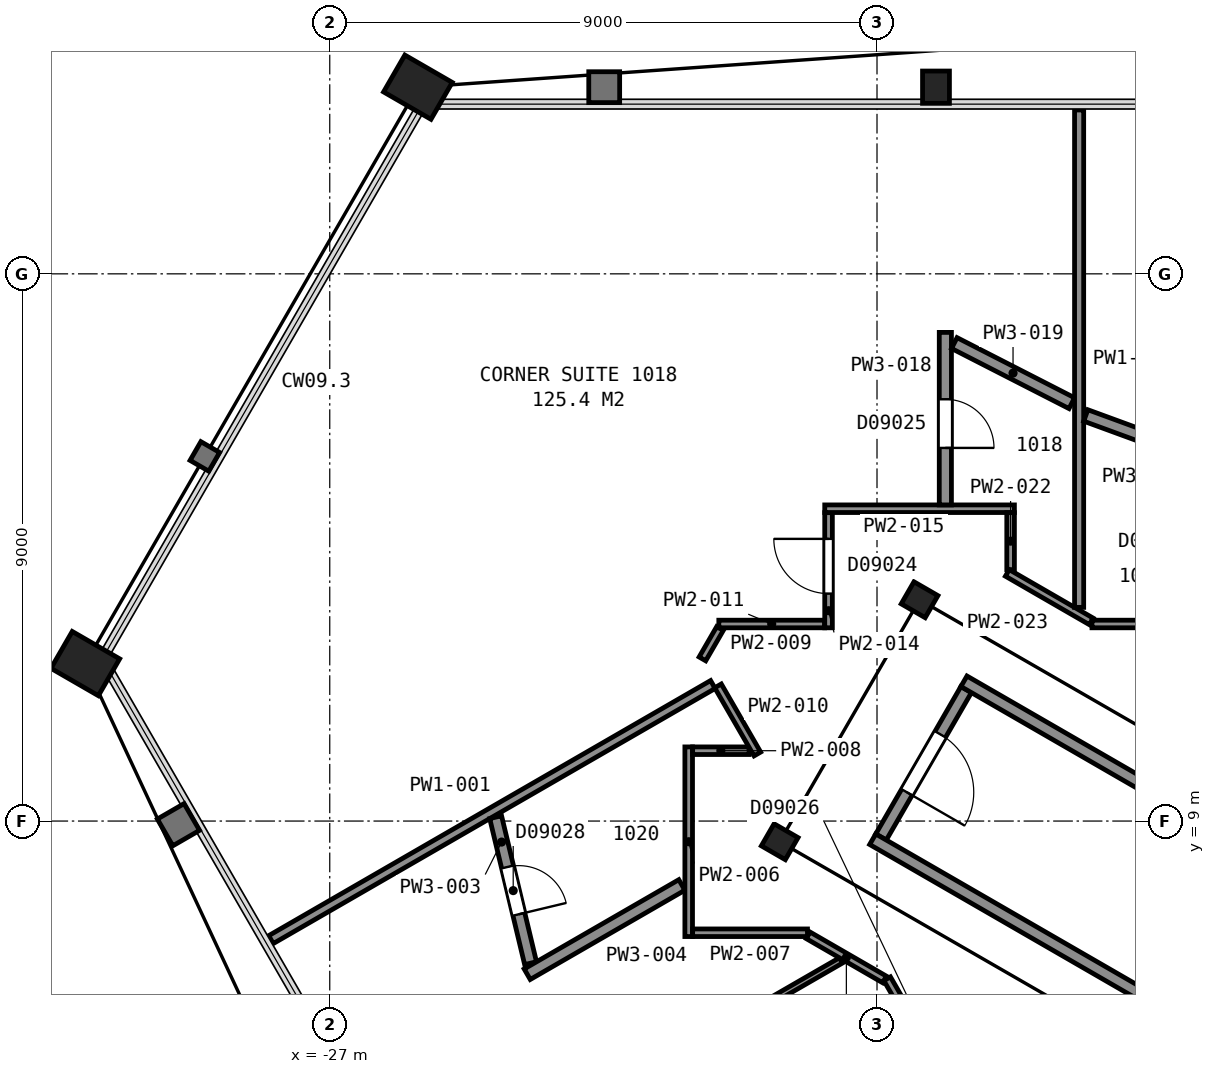
"""IFC4 building model, lengths in metres.
Left out: names, types, materials, properties, quantities, classifications, styles, units other than length and angle.
Written with IfcOpenShell. Run it as: python <this file> out.ifc"""

import sys

from ifc_helpers import new_model, si_unit, direction, frame, frame_2d, origin, origin_2d, place, context, subcontext, project, spatial, rectangle, hollow_rectangle, i_section, extrude, element, fill, save


model = new_model("IFC4")
c1 = context("Model", 3, precision=1e-05, world=origin(), true_north=direction((0.0, 1.0)))
c2 = subcontext(c1, "Body", "Model", "MODEL_VIEW")
j1 = project(units=[si_unit("LENGTHUNIT", "METRE"), si_unit("PLANEANGLEUNIT", "RADIAN")], contexts=[c1])
p1 = place(None, origin())
s1 = spatial("IfcSite", under=j1, at=p1, CompositionType="ELEMENT")
p2 = place(p1, origin())
s2 = spatial("IfcBuilding", under=s1, at=p2, CompositionType="ELEMENT")
p3 = place(p2, frame((0.0, 0.0, 51.2)))
s3 = spatial("IfcBuildingStorey", under=s2, at=p3, CompositionType="ELEMENT", Elevation=51.2)
p4 = place(p3, frame((-17.03, 21.07, 0.0), z_axis=(0.0, 0.0, 1.0), x_axis=(1.0, 0.0, 0.0)))
e1 = element("IfcColumn", 1, at=p4, inside=s3, PredefinedType="COLUMN", context=c2, shape_type="SweptSolid", body=[
    extrude(i_section(OverallWidth=0.442, OverallDepth=0.531, WebThickness=0.066, FlangeThickness=0.106, FilletRadius=0.015, at=origin_2d()), origin(), (0.0, 0.0, 1.0), 3.6),
])
for number, where, z_axis, x_axis in (
    (2, (-25.55, 21.07, 0.0), (0.0, 0.0, 1.0), (0.5, 0.866, 0.0)),
    (3, (-31.02, 11.59, 0.0), (0.0, 0.0, 1.0), (0.5, 0.866, 0.0)),
):
    element("IfcColumn", number, at=place(p3, frame(where, z_axis=z_axis, x_axis=x_axis)), inside=s3, PredefinedType="COLUMN", context=c2, shape_type="SweptSolid", body=[
        extrude(hollow_rectangle(XDim=0.7, YDim=0.9, WallThickness=0.065, at=origin_2d()), origin(), (0.0, 0.0, 1.0), 3.6),
    ])
for number, where, z_axis, x_axis in (
    (4, (-17.3, 12.64, 0.0), (0.0, 0.0, 1.0), (0.5, 0.866, 0.0)),
    (5, (-19.6, 8.66, 0.0), (0.0, 0.0, 1.0), (0.5, 0.866, 0.0)),
):
    element("IfcColumn", number, at=place(p3, frame(where, z_axis=z_axis, x_axis=x_axis)), inside=s3, PredefinedType="COLUMN", context=c2, shape_type="SweptSolid", body=[
        extrude(i_section(OverallWidth=0.419, OverallDepth=0.455, WebThickness=0.042, FlangeThickness=0.068, FilletRadius=0.015, at=origin_2d()), origin(), (0.0, 0.0, 1.0), 3.6),
    ])
p5 = place(p3, frame((-16.534, 11.162, 0.0), z_axis=(0.0, 0.0, 1.0), x_axis=(-0.49998411664, -0.866034573852, 0.0)))
e6 = element("IfcWall", 6, at=p5, inside=s3, PredefinedType="PARTITIONING", context=c2, shape_type="SweptSolid", body=[
    extrude(rectangle(XDim=2.8, YDim=0.2, at=frame_2d((1.4, 0.0))), origin(), (0.0, 0.0, 1.0), 3.35),
])
p6 = place(p5, frame((0.85, 0.0, 0.0)))
e7 = element("IfcOpeningElement", 7, at=p6, cuts=e6, PredefinedType="OPENING", context=c2, shape_type="SweptSolid", body=[
    extrude(rectangle(XDim=1.1, YDim=2.1, at=frame_2d((0.55, 1.05))), frame((0.0, 0.11, 0.0), z_axis=(0.0, -1.0, 0.0), x_axis=(1.0, 0.0, 0.0)), (0.0, 0.0, 1.0), 0.22),
])
for number, where, z_axis, x_axis in (
    (8, (-7.678, 2.701, 0.0), (0.0, 0.0, 1.0), (-0.866, 0.5, 0.0)),
    (9, (-6.178, 5.299, 0.0), (0.0, 0.0, 1.0), (-0.866, 0.5, 0.0)),
):
    element("IfcWall", number, at=place(p3, frame(where, z_axis=z_axis, x_axis=x_axis)), inside=s3, PredefinedType="PARTITIONING", context=c2, shape_type="SweptSolid", body=[
        extrude(rectangle(XDim=12.0, YDim=0.2, at=frame_2d((6.0, 0.0))), origin(), (0.0, 0.0, 1.0), 3.35),
    ])
p7 = place(p3, frame((-27.967, 7.05, 0.0), z_axis=(0.0, 0.0, 1.0), x_axis=(0.86603249375, 0.499987719618, 0.0)))
e10 = element("IfcWall", 10, at=p7, inside=s3, PredefinedType="PARTITIONING", context=c2, shape_type="SweptSolid", body=[
    extrude(rectangle(XDim=8.392, YDim=0.15, at=frame_2d((4.196, 0.0))), origin(), (0.0, 0.0, 1.0), 2.613),
])
p8 = place(p3, frame((-25.476, 2.735, 0.0), z_axis=(0.0, 0.0, 1.0), x_axis=(0.866077639848, 0.499909513568, 0.0)))
e11 = element("IfcWall", 11, at=p8, inside=s3, PredefinedType="PARTITIONING", context=c2, shape_type="SweptSolid", body=[
    extrude(rectangle(XDim=7.946, YDim=0.1, at=frame_2d((3.973, 0.0))), origin(), (0.0, 0.0, 1.0), 2.613),
])
p9 = place(p8, frame((3.604, 0.0, 0.0)))
e12 = element("IfcOpeningElement", 12, at=p9, cuts=e11, PredefinedType="OPENING", context=c2, shape_type="SweptSolid", body=[
    extrude(rectangle(XDim=0.9, YDim=2.1, at=frame_2d((0.45, 1.05))), frame((0.0, 0.06, 0.0), z_axis=(0.0, -1.0, 0.0), x_axis=(1.0, 0.0, 0.0)), (0.0, 0.0, 1.0), 0.12),
])
p10 = place(p3, frame((-24.272, 9.064, 0.0), z_axis=(0.0, 0.0, 1.0), x_axis=(0.232636237171, -0.972563818551, 0.0)))
e13 = element("IfcWall", 13, at=p10, inside=s3, PredefinedType="PARTITIONING", context=c2, shape_type="SweptSolid", body=[
    extrude(rectangle(XDim=2.469, YDim=0.2, at=frame_2d((1.235, 0.0))), origin(), (0.0, 0.0, 1.0), 2.613),
])
p11 = place(p10, frame((0.842, 0.0, 0.0)))
e14 = element("IfcOpeningElement", 14, at=p11, cuts=e13, PredefinedType="OPENING", context=c2, shape_type="SweptSolid", body=[
    extrude(rectangle(XDim=0.8, YDim=2.1, at=frame_2d((0.4, 1.05))), frame((0.0, 0.11, 0.0), z_axis=(0.0, -1.0, 0.0), x_axis=(1.0, 0.0, 0.0)), (0.0, 0.0, 1.0), 0.22),
])
p12 = place(p3, frame((-23.753, 6.481, 0.0), z_axis=(0.0, 0.0, 1.0), x_axis=(0.866070680301, 0.499921570572, 0.0)))
e15 = element("IfcWall", 15, at=p12, inside=s3, PredefinedType="PARTITIONING", context=c2, shape_type="SweptSolid", body=[
    extrude(rectangle(XDim=2.937, YDim=0.2, at=frame_2d((1.468, 0.0))), origin(), (0.0, 0.0, 1.0), 2.613),
])
p13 = place(p3, frame((-21.097, 7.101, 0.0), z_axis=(0.0, 0.0, 1.0), x_axis=(0.0, 1.0, 0.0)))
e16 = element("IfcWall", 16, at=p13, inside=s3, PredefinedType="PARTITIONING", context=c2, shape_type="SweptSolid", body=[
    extrude(rectangle(XDim=3.119, YDim=0.125, at=frame_2d((1.56, 0.0))), origin(), (0.0, 0.0, 1.0), 2.613),
])
p14 = place(p3, frame((-21.032, 7.163, 0.0), z_axis=(0.0, 0.0, 1.0), x_axis=(1.0, 0.0, 0.0)))
e17 = element("IfcWall", 17, at=p14, inside=s3, PredefinedType="PARTITIONING", context=c2, shape_type="SweptSolid", body=[
    extrude(rectangle(XDim=1.888, YDim=0.125, at=frame_2d((0.944, 0.0))), origin(), (0.0, 0.0, 1.0), 2.613),
])
p15 = place(p3, frame((-21.032, 10.157, 0.0), z_axis=(0.0, 0.0, 1.0), x_axis=(1.0, 0.0, 0.0)))
e18 = element("IfcWall", 18, at=p15, inside=s3, PredefinedType="PARTITIONING", context=c2, shape_type="SweptSolid", body=[
    extrude(rectangle(XDim=0.928, YDim=0.125, at=frame_2d((0.464, 0.0))), origin(), (0.0, 0.0, 1.0), 2.613),
])
p16 = place(p3, frame((-20.871, 11.667, 0.0), z_axis=(0.0, 0.0, 1.0), x_axis=(0.500769941337, 0.865580421367, 0.0)))
e19 = element("IfcWall", 19, at=p16, inside=s3, PredefinedType="PARTITIONING", context=c2, shape_type="SweptSolid", body=[
    extrude(rectangle(XDim=0.578, YDim=0.125, at=frame_2d((0.289, 0.0))), origin(), (0.0, 0.0, 1.0), 2.613),
])
p17 = place(p3, frame((-20.615, 11.223, 0.0), z_axis=(0.0, 0.0, 1.0), x_axis=(0.500076370288, -0.865981306888, 0.0)))
e20 = element("IfcWall", 20, at=p17, inside=s3, PredefinedType="PARTITIONING", context=c2, shape_type="SweptSolid", body=[
    extrude(rectangle(XDim=1.294, YDim=0.125, at=frame_2d((0.647, 0.0))), origin(), (0.0, 0.0, 1.0), 2.613),
])
p18 = place(p3, frame((-20.602, 12.241, 0.0), z_axis=(0.0, 0.0, 1.0), x_axis=(1.0, 0.0, 0.0)))
e21 = element("IfcWall", 21, at=p18, inside=s3, PredefinedType="PARTITIONING", context=c2, shape_type="SweptSolid", body=[
    extrude(rectangle(XDim=1.74, YDim=0.125, at=frame_2d((0.87, 0.0))), origin(), (0.0, 0.0, 1.0), 2.613),
])
p19 = place(p3, frame((-19.132, 7.121, 0.0), z_axis=(0.0, 0.0, 1.0), x_axis=(0.865894215669, -0.500227155672, 0.0)))
e22 = element("IfcWall", 22, at=p19, inside=s3, PredefinedType="PARTITIONING", context=c2, shape_type="SweptSolid", body=[
    extrude(rectangle(XDim=1.451, YDim=0.125, at=frame_2d((0.726, 0.0))), origin(), (0.0, 0.0, 1.0), 2.613),
])
p20 = place(p3, frame((-18.797, 12.178, 0.0), z_axis=(0.0, 0.0, 1.0), x_axis=(0.0, 1.0, 0.0)))
e23 = element("IfcWall", 23, at=p20, inside=s3, PredefinedType="PARTITIONING", context=c2, shape_type="SweptSolid", body=[
    extrude(rectangle(XDim=1.894, YDim=0.125, at=frame_2d((0.947, 0.0))), origin(), (0.0, 0.0, 1.0), 2.613),
])
p21 = place(p20, frame((0.562, 0.0, 0.0)))
e24 = element("IfcOpeningElement", 24, at=p21, cuts=e23, PredefinedType="OPENING", context=c2, shape_type="SweptSolid", body=[
    extrude(rectangle(XDim=0.9, YDim=2.1, at=frame_2d((0.45, 1.05))), frame((0.0, 0.073, 0.0), z_axis=(0.0, -1.0, 0.0), x_axis=(1.0, 0.0, 0.0)), (0.0, 0.0, 1.0), 0.145),
])
p22 = place(p3, frame((-18.86, 14.137, 0.0), z_axis=(0.0, 0.0, 1.0), x_axis=(1.0, 0.0, 0.0)))
e25 = element("IfcWall", 25, at=p22, inside=s3, PredefinedType="PARTITIONING", context=c2, shape_type="SweptSolid", body=[
    extrude(rectangle(XDim=3.119, YDim=0.125, at=frame_2d((1.56, 0.0))), origin(), (0.0, 0.0, 1.0), 2.613),
])
p23 = place(p3, frame((-3.766, -17.959, 0.0), z_axis=(0.0, 0.0, 1.0), x_axis=(-0.500002884005, 0.866023738697, 0.0)))
e26 = element("IfcWall", 26, at=p23, inside=s3, PredefinedType="PARTITIONING", context=c2, shape_type="SweptSolid", body=[
    extrude(rectangle(XDim=28.135, YDim=0.125, at=frame_2d((14.067, 0.0))), origin(), (0.0, 0.0, 1.0), 2.613),
])
p24 = place(p23, frame((25.422, 0.0, 0.0)))
e27 = element("IfcOpeningElement", 27, at=p24, cuts=e26, PredefinedType="OPENING", context=c2, shape_type="SweptSolid", body=[
    extrude(rectangle(XDim=1.0, YDim=2.1, at=frame_2d((0.5, 1.05))), frame((0.0, 0.073, 0.0), z_axis=(0.0, -1.0, 0.0), x_axis=(1.0, 0.0, 0.0)), (0.0, 0.0, 1.0), 0.145),
])
p25 = place(p23, frame((21.693, 0.0, 0.0)))
e28 = element("IfcOpeningElement", 28, at=p25, cuts=e26, PredefinedType="OPENING", context=c2, shape_type="SweptSolid", body=[
    extrude(rectangle(XDim=0.9, YDim=2.1, at=frame_2d((0.45, 1.05))), frame((0.0, 0.073, 0.0), z_axis=(0.0, -1.0, 0.0), x_axis=(1.0, 0.0, 0.0)), (0.0, 0.0, 1.0), 0.145),
])
p26 = place(p23, frame((14.438, 0.0, 0.0)))
e29 = element("IfcOpeningElement", 29, at=p26, cuts=e26, PredefinedType="OPENING", context=c2, shape_type="SweptSolid", body=[
    extrude(rectangle(XDim=0.9, YDim=2.1, at=frame_2d((0.45, 1.05))), frame((0.0, 0.073, 0.0), z_axis=(0.0, -1.0, 0.0), x_axis=(1.0, 0.0, 0.0)), (0.0, 0.0, 1.0), 0.145),
])
p27 = place(p23, frame((11.712, 0.0, 0.0)))
e30 = element("IfcOpeningElement", 30, at=p27, cuts=e26, PredefinedType="OPENING", context=c2, shape_type="SweptSolid", body=[
    extrude(rectangle(XDim=0.9, YDim=2.1, at=frame_2d((0.45, 1.05))), frame((0.0, 0.073, 0.0), z_axis=(0.0, -1.0, 0.0), x_axis=(1.0, 0.0, 0.0)), (0.0, 0.0, 1.0), 0.145),
])
p28 = place(p23, frame((4.787, 0.0, 0.0)))
e31 = element("IfcOpeningElement", 31, at=p28, cuts=e26, PredefinedType="OPENING", context=c2, shape_type="SweptSolid", body=[
    extrude(rectangle(XDim=0.9, YDim=2.1, at=frame_2d((0.45, 1.05))), frame((0.0, 0.073, 0.0), z_axis=(0.0, -1.0, 0.0), x_axis=(1.0, 0.0, 0.0)), (0.0, 0.0, 1.0), 0.145),
])
p29 = place(p23, frame((1.762, 0.0, 0.0)))
e32 = element("IfcOpeningElement", 32, at=p29, cuts=e26, PredefinedType="OPENING", context=c2, shape_type="SweptSolid", body=[
    extrude(rectangle(XDim=0.9, YDim=2.1, at=frame_2d((0.45, 1.05))), frame((0.0, 0.073, 0.0), z_axis=(0.0, -1.0, 0.0), x_axis=(1.0, 0.0, 0.0)), (0.0, 0.0, 1.0), 0.145),
])
p30 = place(p3, frame((-16.876, 17.037, 0.0), z_axis=(0.0, 0.0, 1.0), x_axis=(0.0, -1.0, 0.0)))
e33 = element("IfcWall", 33, at=p30, inside=s3, PredefinedType="PARTITIONING", context=c2, shape_type="SweptSolid", body=[
    extrude(rectangle(XDim=2.838, YDim=0.2, at=frame_2d((1.419, 0.0))), origin(), (0.0, 0.0, 1.0), 2.613),
])
p31 = place(p30, frame((1.1, 0.0, 0.0)))
e34 = element("IfcOpeningElement", 34, at=p31, cuts=e33, PredefinedType="OPENING", context=c2, shape_type="SweptSolid", body=[
    extrude(rectangle(XDim=0.8, YDim=2.1, at=frame_2d((0.4, 1.05))), frame((0.0, 0.11, 0.0), z_axis=(0.0, -1.0, 0.0), x_axis=(1.0, 0.0, 0.0)), (0.0, 0.0, 1.0), 0.22),
])
p32 = place(p3, frame((-16.729, 16.862, 0.0), z_axis=(0.0, 0.0, 1.0), x_axis=(0.890181338078, -0.455606392995, 0.0)))
e35 = element("IfcWall", 35, at=p32, inside=s3, PredefinedType="PARTITIONING", context=c2, shape_type="SweptSolid", body=[
    extrude(rectangle(XDim=2.171, YDim=0.2, at=frame_2d((1.085, 0.0))), origin(), (0.0, 0.0, 1.0), 2.613),
])
p33 = place(p3, frame((-15.803, 13.135, 0.0), z_axis=(0.0, 0.0, 1.0), x_axis=(0.0, 1.0, 0.0)))
e36 = element("IfcWall", 36, at=p33, inside=s3, PredefinedType="PARTITIONING", context=c2, shape_type="SweptSolid", body=[
    extrude(rectangle(XDim=0.937, YDim=0.125, at=frame_2d((0.469, 0.0))), origin(), (0.0, 0.0, 1.0), 2.613),
])
p34 = place(p3, frame((-15.857, 13.081, 0.0), z_axis=(0.0, 0.0, 1.0), x_axis=(0.865974057503, -0.500088923824, 0.0)))
e37 = element("IfcWall", 37, at=p34, inside=s3, PredefinedType="PARTITIONING", context=c2, shape_type="SweptSolid", body=[
    extrude(rectangle(XDim=1.595, YDim=0.125, at=frame_2d((0.798, 0.0))), origin(), (0.0, 0.0, 1.0), 2.613),
])
p35 = place(p3, frame((-14.676, 12.514, 0.0), z_axis=(0.0, 0.0, 1.0), x_axis=(0.0, 1.0, 0.0)))
e38 = element("IfcWall", 38, at=p35, inside=s3, PredefinedType="PARTITIONING", context=c2, shape_type="SweptSolid", body=[
    extrude(rectangle(XDim=8.181, YDim=0.15, at=frame_2d((4.09, 0.0))), origin(), (0.0, 0.0, 1.0), 2.613),
])
p36 = place(p3, frame((-14.567, 15.671, 0.0), z_axis=(0.0, 0.0, 1.0), x_axis=(0.938894816734, -0.344204188105, 0.0)))
e39 = element("IfcWall", 39, at=p36, inside=s3, PredefinedType="PARTITIONING", context=c2, shape_type="SweptSolid", body=[
    extrude(rectangle(XDim=1.99, YDim=0.2, at=frame_2d((0.995, 0.0))), origin(), (0.0, 0.0, 1.0), 2.613),
])
p37 = place(p3, frame((-14.465, 12.241, 0.0), z_axis=(0.0, 0.0, 1.0), x_axis=(1.0, 0.0, 0.0)))
e40 = element("IfcWall", 40, at=p37, inside=s3, PredefinedType="PARTITIONING", context=c2, shape_type="SweptSolid", body=[
    extrude(rectangle(XDim=28.929, YDim=0.125, at=frame_2d((14.465, 0.0))), origin(), (0.0, 0.0, 1.0), 2.613),
])
p38 = place(p37, frame((25.252, 0.0, 0.0)))
e41 = element("IfcOpeningElement", 41, at=p38, cuts=e40, PredefinedType="OPENING", context=c2, shape_type="SweptSolid", body=[
    extrude(rectangle(XDim=0.9, YDim=2.1, at=frame_2d((0.45, 1.05))), frame((0.0, 0.073, 0.0), z_axis=(0.0, -1.0, 0.0), x_axis=(1.0, 0.0, 0.0)), (0.0, 0.0, 1.0), 0.145),
])
p39 = place(p37, frame((22.564, 0.0, 0.0)))
e42 = element("IfcOpeningElement", 42, at=p39, cuts=e40, PredefinedType="OPENING", context=c2, shape_type="SweptSolid", body=[
    extrude(rectangle(XDim=0.9, YDim=2.1, at=frame_2d((0.45, 1.05))), frame((0.0, 0.073, 0.0), z_axis=(0.0, -1.0, 0.0), x_axis=(1.0, 0.0, 0.0)), (0.0, 0.0, 1.0), 0.145),
])
p40 = place(p37, frame((15.302, 0.0, 0.0)))
e43 = element("IfcOpeningElement", 43, at=p40, cuts=e40, PredefinedType="OPENING", context=c2, shape_type="SweptSolid", body=[
    extrude(rectangle(XDim=0.9, YDim=2.1, at=frame_2d((0.45, 1.05))), frame((0.0, 0.073, 0.0), z_axis=(0.0, -1.0, 0.0), x_axis=(1.0, 0.0, 0.0)), (0.0, 0.0, 1.0), 0.145),
])
p41 = place(p37, frame((12.365, 0.0, 0.0)))
e44 = element("IfcOpeningElement", 44, at=p41, cuts=e40, PredefinedType="OPENING", context=c2, shape_type="SweptSolid", body=[
    extrude(rectangle(XDim=0.9, YDim=2.1, at=frame_2d((0.45, 1.05))), frame((0.0, 0.073, 0.0), z_axis=(0.0, -1.0, 0.0), x_axis=(1.0, 0.0, 0.0)), (0.0, 0.0, 1.0), 0.145),
])
p42 = place(p37, frame((5.477, 0.0, 0.0)))
e45 = element("IfcOpeningElement", 45, at=p42, cuts=e40, PredefinedType="OPENING", context=c2, shape_type="SweptSolid", body=[
    extrude(rectangle(XDim=0.9, YDim=2.1, at=frame_2d((0.45, 1.05))), frame((0.0, 0.073, 0.0), z_axis=(0.0, -1.0, 0.0), x_axis=(1.0, 0.0, 0.0)), (0.0, 0.0, 1.0), 0.145),
])
p43 = place(p37, frame((2.789, 0.0, 0.0)))
e46 = element("IfcOpeningElement", 46, at=p43, cuts=e40, PredefinedType="OPENING", context=c2, shape_type="SweptSolid", body=[
    extrude(rectangle(XDim=0.9, YDim=2.1, at=frame_2d((0.45, 1.05))), frame((0.0, 0.073, 0.0), z_axis=(0.0, -1.0, 0.0), x_axis=(1.0, 0.0, 0.0)), (0.0, 0.0, 1.0), 0.145),
])
p44 = place(p6, origin())
e47 = element("IfcDoor", 47, at=p44, inside=s3, OperationType="SINGLE_SWING_RIGHT", PredefinedType="DOOR", context=c2, shape_type="SweptSolid", body=[
    extrude(rectangle(XDim=1.1, YDim=2.1, at=frame_2d((0.55, 1.05))), frame((0.0, 0.025, 0.0), z_axis=(0.0, -1.0, 0.0), x_axis=(1.0, 0.0, 0.0)), (0.0, 0.0, 1.0), 0.05),
])
fill(e7, e47)
p45 = place(p11, origin())
e48 = element("IfcDoor", 48, at=p45, inside=s3, OperationType="SINGLE_SWING_RIGHT", PredefinedType="DOOR", context=c2, shape_type="SweptSolid", body=[
    extrude(rectangle(XDim=0.8, YDim=2.1, at=frame_2d((0.4, 1.05))), frame((0.0, 0.025, 0.0), z_axis=(0.0, -1.0, 0.0), x_axis=(1.0, 0.0, 0.0)), (0.0, 0.0, 1.0), 0.05),
])
fill(e14, e48)
p46 = place(p21, origin())
e49 = element("IfcDoor", 49, at=p46, inside=s3, OperationType="SINGLE_SWING_RIGHT", PredefinedType="DOOR", context=c2, shape_type="SweptSolid", body=[
    extrude(rectangle(XDim=0.9, YDim=2.1, at=frame_2d((0.45, 1.05))), frame((0.0, 0.025, 0.0), z_axis=(0.0, -1.0, 0.0), x_axis=(1.0, 0.0, 0.0)), (0.0, 0.0, 1.0), 0.05),
])
fill(e24, e49)
p47 = place(p31, origin())
e50 = element("IfcDoor", 50, at=p47, inside=s3, OperationType="SINGLE_SWING_RIGHT", PredefinedType="DOOR", context=c2, shape_type="SweptSolid", body=[
    extrude(rectangle(XDim=0.8, YDim=2.1, at=frame_2d((0.4, 1.05))), frame((0.0, 0.025, 0.0), z_axis=(0.0, -1.0, 0.0), x_axis=(1.0, 0.0, 0.0)), (0.0, 0.0, 1.0), 0.05),
])
fill(e34, e50)
save(model, sys.argv[1])
